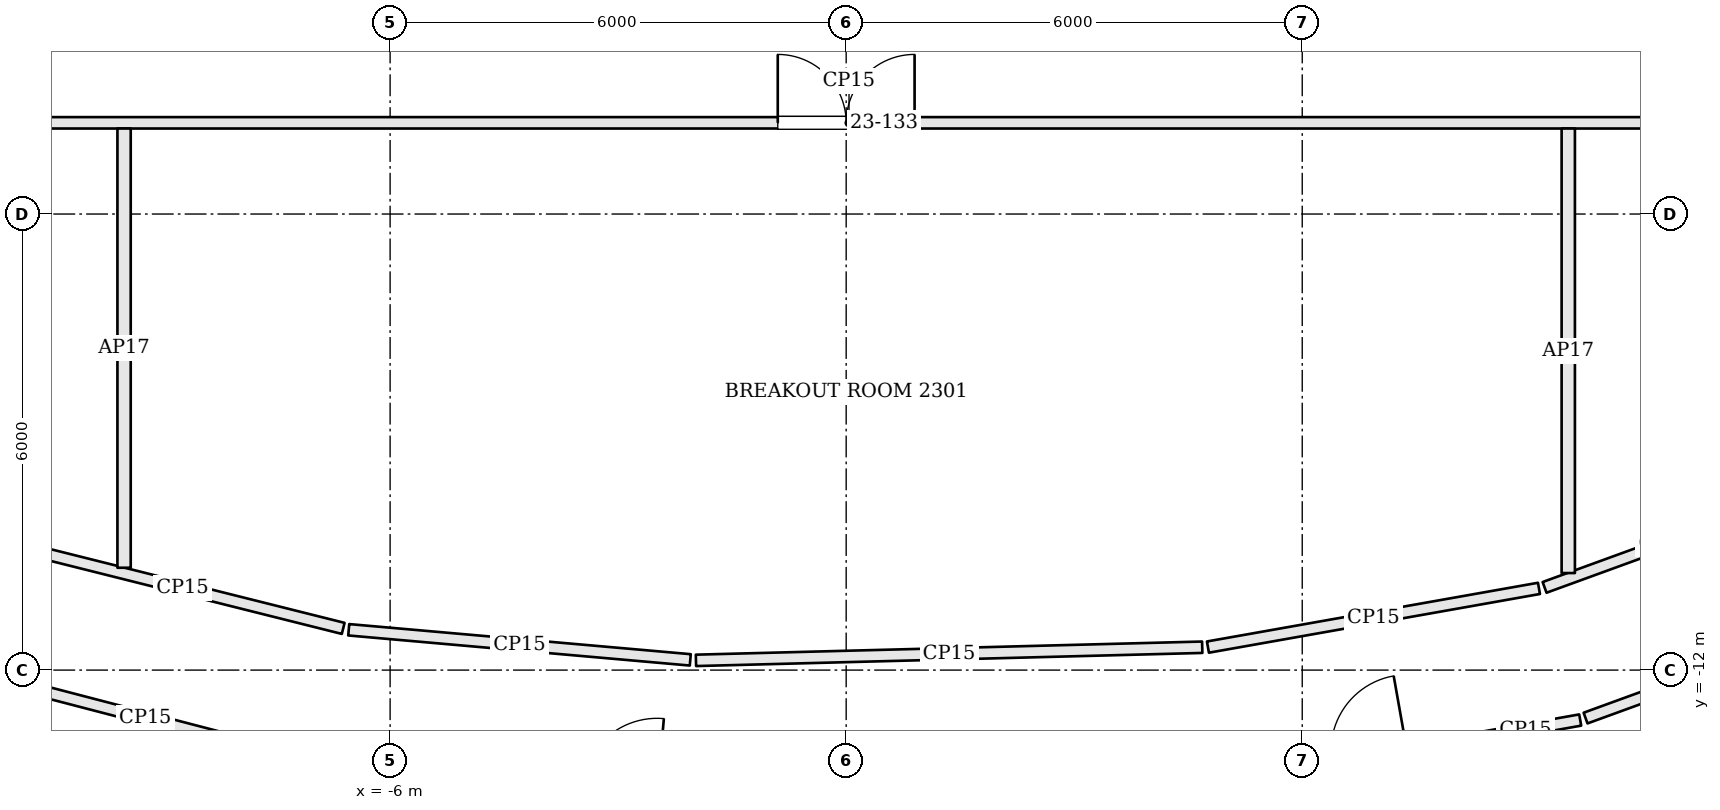
"""IFC4 building model, lengths in metres.
Left out: names, types, materials, properties, quantities, classifications, styles, units other than length and angle.
Written with IfcOpenShell. Run it as: python <this file> out.ifc"""

import sys

from ifc_helpers import new_model, si_unit, direction, frame, frame_2d, origin, place, context, subcontext, project, spatial, rectangle, extrude, element, fill, save


model = new_model("IFC4")
c1 = context("Model", 3, precision=1e-05, world=origin(), true_north=direction((0.0, 1.0)))
c2 = subcontext(c1, "Body", "Model", "MODEL_VIEW")
j1 = project(units=[si_unit("LENGTHUNIT", "METRE"), si_unit("PLANEANGLEUNIT", "RADIAN")], contexts=[c1])
p1 = place(None, origin())
s1 = spatial("IfcSite", under=j1, at=p1, CompositionType="ELEMENT")
p2 = place(p1, origin())
s2 = spatial("IfcBuilding", under=s1, at=p2, CompositionType="ELEMENT")
p3 = place(p2, frame((0.0, 0.0, 99.6)))
s3 = spatial("IfcBuildingStorey", under=s2, at=p3, CompositionType="ELEMENT", Elevation=99.6)
p4 = place(p3, frame((-11.595, -12.012, 0.0), z_axis=(0.0, 0.0, 1.0), x_axis=(0.967696436642, -0.252118239146, 0.0)))
e1 = element("IfcWall", 1, at=p4, inside=s3, PredefinedType="PARTITIONING", context=c2, shape_type="SweptSolid", body=[
    extrude(rectangle(XDim=4.91, YDim=0.15, at=frame_2d((2.455, 0.0))), origin(), (0.0, 0.0, 1.0), 2.784),
])
p5 = place(p3, frame((8.221, -12.912, 0.0), z_axis=(0.0, 0.0, 1.0), x_axis=(0.984645082055, 0.174568216995, 0.0)))
e2 = element("IfcWall", 2, at=p5, inside=s3, PredefinedType="PARTITIONING", context=c2, shape_type="SweptSolid", body=[
    extrude(rectangle(XDim=1.459, YDim=0.15, at=frame_2d((0.729, 0.0))), origin(), (0.0, 0.0, 1.0), 2.784),
])
p6 = place(p3, frame((9.728, -12.631, 0.0), z_axis=(0.0, 0.0, 1.0), x_axis=(0.939626438181, 0.342201923826, 0.0)))
e3 = element("IfcWall", 3, at=p6, inside=s3, PredefinedType="PARTITIONING", context=c2, shape_type="SweptSolid", body=[
    extrude(rectangle(XDim=3.716, YDim=0.15, at=frame_2d((1.858, 0.0))), origin(), (0.0, 0.0, 1.0), 2.784),
])
p7 = place(p6, frame((1.45, 0.0, 0.0)))
e4 = element("IfcOpeningElement", 4, at=p7, cuts=e3, PredefinedType="OPENING", context=c2, shape_type="SweptSolid", body=[
    extrude(rectangle(XDim=1.8, YDim=2.1, at=frame_2d((0.9, 1.05))), frame((0.0, 0.085, 0.0), z_axis=(0.0, -1.0, 0.0), x_axis=(1.0, 0.0, 0.0)), (0.0, 0.0, 1.0), 0.17),
])
p8 = place(p3, frame((12.353, -9.76, 0.0), z_axis=(0.0, 0.0, 1.0), x_axis=(-0.939632450309, -0.342185415127, 0.0)))
e5 = element("IfcWall", 5, at=p8, inside=s3, PredefinedType="PARTITIONING", context=c2, shape_type="SweptSolid", body=[
    extrude(rectangle(XDim=3.368, YDim=0.15, at=frame_2d((1.684, 0.0))), origin(), (0.0, 0.0, 1.0), 2.784),
])
p9 = place(p3, frame((9.115, -10.925, 0.0), z_axis=(0.0, 0.0, 1.0), x_axis=(-0.984632605417, -0.174638576352, 0.0)))
e6 = element("IfcWall", 6, at=p9, inside=s3, PredefinedType="PARTITIONING", context=c2, shape_type="SweptSolid", body=[
    extrude(rectangle(XDim=4.423, YDim=0.15, at=frame_2d((2.211, 0.0))), origin(), (0.0, 0.0, 1.0), 2.784),
])
p10 = place(p3, frame((4.684, -11.699, 0.0), z_axis=(0.0, 0.0, 1.0), x_axis=(-0.999663438204, -0.025942442425, 0.0)))
e7 = element("IfcWall", 7, at=p10, inside=s3, PredefinedType="PARTITIONING", context=c2, shape_type="SweptSolid", body=[
    extrude(rectangle(XDim=6.663, YDim=0.15, at=frame_2d((3.332, 0.0))), origin(), (0.0, 0.0, 1.0), 2.784),
])
p11 = place(p3, frame((-2.051, -11.865, 0.0), z_axis=(0.0, 0.0, 1.0), x_axis=(-0.996139599493, 0.087783246245, 0.0)))
e8 = element("IfcWall", 8, at=p11, inside=s3, PredefinedType="PARTITIONING", context=c2, shape_type="SweptSolid", body=[
    extrude(rectangle(XDim=4.511, YDim=0.15, at=frame_2d((2.255, 0.0))), origin(), (0.0, 0.0, 1.0), 2.784),
])
p12 = place(p3, frame((-6.617, -11.451, 0.0), z_axis=(0.0, 0.0, 1.0), x_axis=(-0.969987441267, 0.243155020069, 0.0)))
e9 = element("IfcWall", 9, at=p12, inside=s3, PredefinedType="PARTITIONING", context=c2, shape_type="SweptSolid", body=[
    extrude(rectangle(XDim=4.359, YDim=0.15, at=frame_2d((2.179, 0.0))), origin(), (0.0, 0.0, 1.0), 2.784),
])
p13 = place(p3, frame((-14.725, -4.8, 0.0), z_axis=(0.0, 0.0, 1.0), x_axis=(1.0, 0.0, 0.0)))
e10 = element("IfcWall", 10, at=p13, inside=s3, PredefinedType="PARTITIONING", context=c2, shape_type="SweptSolid", body=[
    extrude(rectangle(XDim=29.525, YDim=0.15, at=frame_2d((14.763, 0.0))), origin(), (0.0, 0.0, 1.0), 2.784),
])
p14 = place(p13, frame((13.825, 0.0, 0.0)))
e11 = element("IfcOpeningElement", 11, at=p14, cuts=e10, PredefinedType="OPENING", context=c2, shape_type="SweptSolid", body=[
    extrude(rectangle(XDim=1.8, YDim=2.1, at=frame_2d((0.9, 1.05))), frame((0.0, 0.085, 0.0), z_axis=(0.0, -1.0, 0.0), x_axis=(1.0, 0.0, 0.0)), (0.0, 0.0, 1.0), 0.17),
])
p15 = place(p3, frame((-9.5, -10.654, 0.0), z_axis=(0.0, 0.0, 1.0), x_axis=(0.0, 1.0, 0.0)))
e12 = element("IfcWall", 12, at=p15, inside=s3, PredefinedType="PARTITIONING", context=c2, shape_type="SweptSolid", body=[
    extrude(rectangle(XDim=5.779, YDim=0.175, at=frame_2d((2.889, 0.0))), origin(), (0.0, 0.0, 1.0), 2.784),
])
p16 = place(p3, frame((9.5, -10.723, 0.0), z_axis=(0.0, 0.0, 1.0), x_axis=(0.0, 1.0, 0.0)))
e13 = element("IfcWall", 13, at=p16, inside=s3, PredefinedType="PARTITIONING", context=c2, shape_type="SweptSolid", body=[
    extrude(rectangle(XDim=5.848, YDim=0.175, at=frame_2d((2.924, 0.0))), origin(), (0.0, 0.0, 1.0), 2.784),
])
p17 = place(p14, origin())
e14 = element("IfcDoor", 14, at=p17, inside=s3, OperationType="DOUBLE_DOOR_SINGLE_SWING", PredefinedType="DOOR", context=c2, shape_type="SweptSolid", body=[
    extrude(rectangle(XDim=1.8, YDim=2.1, at=frame_2d((0.9, 1.05))), frame((0.0, 0.025, 0.0), z_axis=(0.0, -1.0, 0.0), x_axis=(1.0, 0.0, 0.0)), (0.0, 0.0, 1.0), 0.05),
])
fill(e11, e14)
save(model, sys.argv[1])
